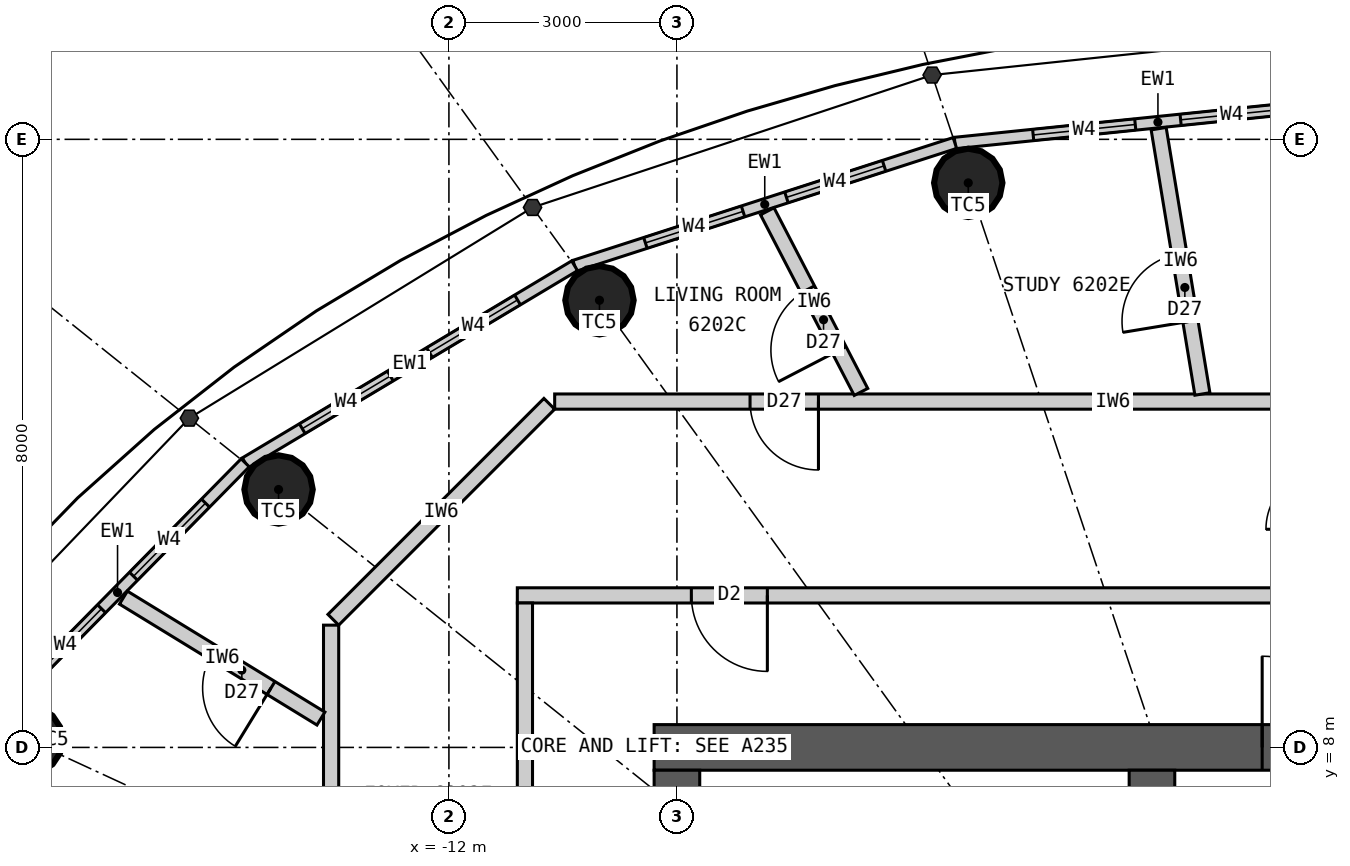
"""IFC4 building model, lengths in metres.
Left out: names, types, materials, properties, quantities, classifications, styles, units other than length and angle.
Written with IfcOpenShell. Run it as: python <this file> out.ifc"""

import sys

from ifc_helpers import new_model, si_unit, direction, frame, frame_2d, origin, origin_2d, place, context, subcontext, project, spatial, rectangle, circle, extrude, clip, halfspace, element, fill, save


model = new_model("IFC4")
c1 = context("Model", 3, precision=1e-05, world=origin(), true_north=direction((0.0, 1.0)))
c2 = subcontext(c1, "Body", "Model", "MODEL_VIEW")
j1 = project(units=[si_unit("LENGTHUNIT", "METRE"), si_unit("PLANEANGLEUNIT", "RADIAN")], contexts=[c1])
p1 = place(None, origin())
s1 = spatial("IfcSite", under=j1, at=p1, CompositionType="ELEMENT")
p2 = place(p1, origin())
s2 = spatial("IfcBuilding", under=s1, at=p2, CompositionType="ELEMENT")
p3 = place(p2, frame((0.0, 0.0, 229.2)))
s3 = spatial("IfcBuildingStorey", under=s2, at=p3, CompositionType="ELEMENT", Elevation=229.2)
for number, where, z_axis, x_axis in (
    (1, (-5.167, 15.427, 0.0), (0.0, 0.0, 1.0), (1.0, 0.0, 0.0)),
    (2, (-10.019, 13.883, 0.0), (0.0, 0.0, 1.0), (1.0, 0.0, 0.0)),
    (3, (-14.241, 11.393, 0.0), (0.0, 0.0, 1.0), (1.0, 0.0, 0.0)),
    (4, (-17.532, 8.098, 0.0), (0.0, 0.0, 1.0), (1.0, 0.0, 0.0)),
):
    element("IfcColumn", number, at=place(p3, frame(where, z_axis=z_axis, x_axis=x_axis)), inside=s3, PredefinedType="COLUMN", context=c2, shape_type="Clipping", body=[
        clip(extrude(circle(Radius=0.45, at=origin_2d()), origin(), (0.0, 0.0, 1.0), 3.3), halfspace(frame((0.0, 0.0, 2.25), z_axis=(0.0, 0.0, 1.0), x_axis=(1.0, 0.0, 0.0)), False)),
    ])
p4 = place(p3, frame((-9.3, 8.0, 0.0), z_axis=(0.0, 0.0, 1.0), x_axis=(1.0, 0.0, 0.0)))
e5 = element("IfcWall", 5, at=p4, inside=s3, PredefinedType="SHEAR", context=c2, shape_type="SweptSolid", body=[
    extrude(rectangle(XDim=18.6, YDim=0.6, at=frame_2d((9.3, 0.0))), origin(), (0.0, 0.0, 1.0), 3.3),
])
p5 = place(p4, frame((8.0, 0.0, 0.0)))
e6 = element("IfcOpeningElement", 6, at=p5, cuts=e5, PredefinedType="OPENING", context=c2, shape_type="SweptSolid", body=[
    extrude(rectangle(XDim=1.2, YDim=2.2, at=frame_2d((0.6, 1.1))), frame((0.0, 0.31, 0.0), z_axis=(0.0, -1.0, 0.0), x_axis=(1.0, 0.0, 0.0)), (0.0, 0.0, 1.0), 0.62),
])
p6 = place(p4, frame((15.6, 0.0, 0.0)))
e7 = element("IfcOpeningElement", 7, at=p6, cuts=e5, PredefinedType="OPENING", context=c2, shape_type="SweptSolid", body=[
    extrude(rectangle(XDim=0.9, YDim=2.2, at=frame_2d((0.45, 1.1))), frame((0.0, 0.31, 0.0), z_axis=(0.0, -1.0, 0.0), x_axis=(1.0, 0.0, 0.0)), (0.0, 0.0, 1.0), 0.62),
])
p7 = place(p3, frame((-9.0, 7.7, 0.0), z_axis=(0.0, 0.0, 1.0), x_axis=(0.0, -1.0, 0.0)))
e8 = element("IfcWall", 8, at=p7, inside=s3, PredefinedType="SHEAR", context=c2, shape_type="SweptSolid", body=[
    extrude(rectangle(XDim=15.4, YDim=0.6, at=frame_2d((7.7, 0.0))), origin(), (0.0, 0.0, 1.0), 3.3),
])
p8 = place(p7, frame((6.8, 0.0, 0.0)))
e9 = element("IfcOpeningElement", 9, at=p8, cuts=e8, PredefinedType="OPENING", context=c2, shape_type="SweptSolid", body=[
    extrude(rectangle(XDim=1.8, YDim=2.2, at=frame_2d((0.9, 1.1))), frame((0.0, 0.31, 0.0), z_axis=(0.0, -1.0, 0.0), x_axis=(1.0, 0.0, 0.0)), (0.0, 0.0, 1.0), 0.62),
])
p9 = place(p3, frame((-2.75, 4.5, 0.0), z_axis=(0.0, 0.0, 1.0), x_axis=(0.0, 1.0, 0.0)))
e10 = element("IfcWall", 10, at=p9, inside=s3, PredefinedType="SHEAR", context=c2, shape_type="SweptSolid", body=[
    extrude(rectangle(XDim=3.2, YDim=0.6, at=frame_2d((1.6, 0.0))), origin(), (0.0, 0.0, 1.0), 3.3),
])
p10 = place(p9, frame((0.925, 0.0, 0.0)))
e11 = element("IfcOpeningElement", 11, at=p10, cuts=e10, PredefinedType="OPENING", context=c2, shape_type="SweptSolid", body=[
    extrude(rectangle(XDim=1.1, YDim=2.2, at=frame_2d((0.55, 1.1))), frame((0.0, 0.31, 0.0), z_axis=(0.0, -1.0, 0.0), x_axis=(1.0, 0.0, 0.0)), (0.0, 0.0, 1.0), 0.62),
])
p11 = place(p3, frame((0.0, 16.5, 0.0), z_axis=(0.0, 0.0, 1.0), x_axis=(-0.994774574972, -0.102095763818, 0.0)))
e12 = element("IfcWall", 12, at=p11, inside=s3, PredefinedType="ELEMENTEDWALL", context=c2, shape_type="SweptSolid", body=[
    extrude(rectangle(XDim=5.371, YDim=0.15, at=frame_2d((2.686, 0.0))), origin(), (0.0, 0.0, 1.0), 3.05),
])
p12 = place(p11, frame((1.035, 0.0, 0.9)))
e13 = element("IfcOpeningElement", 13, at=p12, cuts=e12, PredefinedType="OPENING", context=c2, shape_type="SweptSolid", body=[
    extrude(rectangle(XDim=1.35, YDim=1.9, at=frame_2d((0.675, 0.95))), frame((0.0, 0.085, 0.0), z_axis=(0.0, -1.0, 0.0), x_axis=(1.0, 0.0, 0.0)), (0.0, 0.0, 1.0), 0.17),
])
p13 = place(p11, frame((2.985, 0.0, 0.9)))
e14 = element("IfcOpeningElement", 14, at=p13, cuts=e12, PredefinedType="OPENING", context=c2, shape_type="SweptSolid", body=[
    extrude(rectangle(XDim=1.35, YDim=1.9, at=frame_2d((0.675, 0.95))), frame((0.0, 0.085, 0.0), z_axis=(0.0, -1.0, 0.0), x_axis=(1.0, 0.0, 0.0)), (0.0, 0.0, 1.0), 0.17),
])
p14 = place(p3, frame((-5.343, 15.952, 0.0), z_axis=(0.0, 0.0, 1.0), x_axis=(-0.951644702515, -0.307200846638, 0.0)))
e15 = element("IfcWall", 15, at=p14, inside=s3, PredefinedType="ELEMENTEDWALL", context=c2, shape_type="SweptSolid", body=[
    extrude(rectangle(XDim=5.258, YDim=0.15, at=frame_2d((2.629, 0.0))), origin(), (0.0, 0.0, 1.0), 3.05),
])
p15 = place(p14, frame((0.979, 0.0, 0.9)))
e16 = element("IfcOpeningElement", 16, at=p15, cuts=e15, PredefinedType="OPENING", context=c2, shape_type="SweptSolid", body=[
    extrude(rectangle(XDim=1.35, YDim=1.9, at=frame_2d((0.675, 0.95))), frame((0.0, 0.085, 0.0), z_axis=(0.0, -1.0, 0.0), x_axis=(1.0, 0.0, 0.0)), (0.0, 0.0, 1.0), 0.17),
])
p16 = place(p14, frame((2.929, 0.0, 0.9)))
e17 = element("IfcOpeningElement", 17, at=p16, cuts=e15, PredefinedType="OPENING", context=c2, shape_type="SweptSolid", body=[
    extrude(rectangle(XDim=1.35, YDim=1.9, at=frame_2d((0.675, 0.95))), frame((0.0, 0.085, 0.0), z_axis=(0.0, -1.0, 0.0), x_axis=(1.0, 0.0, 0.0)), (0.0, 0.0, 1.0), 0.17),
])
p17 = place(p3, frame((-10.346, 14.336, 0.0), z_axis=(0.0, 0.0, 1.0), x_axis=(-0.85822150553, -0.513279502265, 0.0)))
e18 = element("IfcWall", 18, at=p17, inside=s3, PredefinedType="ELEMENTEDWALL", context=c2, shape_type="SweptSolid", body=[
    extrude(rectangle(XDim=5.05, YDim=0.15, at=frame_2d((2.525, 0.0))), origin(), (0.0, 0.0, 1.0), 3.05),
])
p18 = place(p17, frame((0.875, 0.0, 0.9)))
e19 = element("IfcOpeningElement", 19, at=p18, cuts=e18, PredefinedType="OPENING", context=c2, shape_type="SweptSolid", body=[
    extrude(rectangle(XDim=1.35, YDim=1.9, at=frame_2d((0.675, 0.95))), frame((0.0, 0.085, 0.0), z_axis=(0.0, -1.0, 0.0), x_axis=(1.0, 0.0, 0.0)), (0.0, 0.0, 1.0), 0.17),
])
p19 = place(p17, frame((2.825, 0.0, 0.9)))
e20 = element("IfcOpeningElement", 20, at=p19, cuts=e18, PredefinedType="OPENING", context=c2, shape_type="SweptSolid", body=[
    extrude(rectangle(XDim=1.35, YDim=1.9, at=frame_2d((0.675, 0.95))), frame((0.0, 0.085, 0.0), z_axis=(0.0, -1.0, 0.0), x_axis=(1.0, 0.0, 0.0)), (0.0, 0.0, 1.0), 0.17),
])
p20 = place(p3, frame((-14.68, 11.744, 0.0), z_axis=(0.0, 0.0, 1.0), x_axis=(-0.701527379618, -0.712642501993, 0.0)))
e21 = element("IfcWall", 21, at=p20, inside=s3, PredefinedType="ELEMENTEDWALL", context=c2, shape_type="SweptSolid", body=[
    extrude(rectangle(XDim=4.788, YDim=0.15, at=frame_2d((2.394, 0.0))), origin(), (0.0, 0.0, 1.0), 3.05),
])
p21 = place(p20, frame((0.744, 0.0, 0.9)))
e22 = element("IfcOpeningElement", 22, at=p21, cuts=e21, PredefinedType="OPENING", context=c2, shape_type="SweptSolid", body=[
    extrude(rectangle(XDim=1.35, YDim=1.9, at=frame_2d((0.675, 0.95))), frame((0.0, 0.085, 0.0), z_axis=(0.0, -1.0, 0.0), x_axis=(1.0, 0.0, 0.0)), (0.0, 0.0, 1.0), 0.17),
])
p22 = place(p20, frame((2.694, 0.0, 0.9)))
e23 = element("IfcOpeningElement", 23, at=p22, cuts=e21, PredefinedType="OPENING", context=c2, shape_type="SweptSolid", body=[
    extrude(rectangle(XDim=1.35, YDim=1.9, at=frame_2d((0.675, 0.95))), frame((0.0, 0.085, 0.0), z_axis=(0.0, -1.0, 0.0), x_axis=(1.0, 0.0, 0.0)), (0.0, 0.0, 1.0), 0.17),
])
p23 = place(p3, frame((-11.1, 10.0, 0.0), z_axis=(0.0, 0.0, 1.0), x_axis=(1.0, 0.0, 0.0)))
e24 = element("IfcWall", 24, at=p23, inside=s3, PredefinedType="PARTITIONING", context=c2, shape_type="SweptSolid", body=[
    extrude(rectangle(XDim=22.2, YDim=0.2, at=frame_2d((11.1, 0.0))), origin(), (0.0, 0.0, 1.0), 3.05),
])
p24 = place(p23, frame((2.29, 0.0, 0.0)))
e25 = element("IfcOpeningElement", 25, at=p24, cuts=e24, PredefinedType="OPENING", context=c2, shape_type="SweptSolid", body=[
    extrude(rectangle(XDim=1.0, YDim=2.2, at=frame_2d((0.5, 1.1))), frame((0.0, 0.11, 0.0), z_axis=(0.0, -1.0, 0.0), x_axis=(1.0, 0.0, 0.0)), (0.0, 0.0, 1.0), 0.22),
])
p25 = place(p3, frame((-11.0, 9.9, 0.0), z_axis=(0.0, 0.0, 1.0), x_axis=(0.0, -1.0, 0.0)))
e26 = element("IfcWall", 26, at=p25, inside=s3, PredefinedType="PARTITIONING", context=c2, shape_type="SweptSolid", body=[
    extrude(rectangle(XDim=19.8, YDim=0.2, at=frame_2d((9.9, 0.0))), origin(), (0.0, 0.0, 1.0), 3.05),
])
p26 = place(p25, frame((11.444, 0.0, 0.0)))
e27 = element("IfcOpeningElement", 27, at=p26, cuts=e26, PredefinedType="OPENING", context=c2, shape_type="SweptSolid", body=[
    extrude(rectangle(XDim=1.0, YDim=2.2, at=frame_2d((0.5, 1.1))), frame((0.0, 0.11, 0.0), z_axis=(0.0, -1.0, 0.0), x_axis=(1.0, 0.0, 0.0)), (0.0, 0.0, 1.0), 0.22),
])
p27 = place(p3, frame((4.082, 12.55, 0.0), z_axis=(0.0, 0.0, 1.0), x_axis=(-1.0, 0.0, 0.0)))
e28 = element("IfcWall", 28, at=p27, inside=s3, PredefinedType="PARTITIONING", context=c2, shape_type="SweptSolid", body=[
    extrude(rectangle(XDim=14.691, YDim=0.2, at=frame_2d((7.345, 0.0))), origin(), (0.0, 0.0, 1.0), 3.05),
])
p28 = place(p27, frame((2.102, 0.0, 0.0)))
e29 = element("IfcOpeningElement", 29, at=p28, cuts=e28, PredefinedType="OPENING", context=c2, shape_type="SweptSolid", body=[
    extrude(rectangle(XDim=0.8, YDim=2.1, at=frame_2d((0.4, 1.05))), frame((0.0, 0.11, 0.0), z_axis=(0.0, -1.0, 0.0), x_axis=(1.0, 0.0, 0.0)), (0.0, 0.0, 1.0), 0.22),
])
p29 = place(p27, frame((11.22, 0.0, 0.0)))
e30 = element("IfcOpeningElement", 30, at=p29, cuts=e28, PredefinedType="OPENING", context=c2, shape_type="SweptSolid", body=[
    extrude(rectangle(XDim=0.9, YDim=2.1, at=frame_2d((0.45, 1.05))), frame((0.0, 0.11, 0.0), z_axis=(0.0, -1.0, 0.0), x_axis=(1.0, 0.0, 0.0)), (0.0, 0.0, 1.0), 0.22),
])
p30 = place(p3, frame((-10.679, 12.521, 0.0), z_axis=(0.0, 0.0, 1.0), x_axis=(-0.707106781187, -0.707106781187, 0.0)))
e31 = element("IfcWall", 31, at=p30, inside=s3, PredefinedType="PARTITIONING", context=c2, shape_type="SweptSolid", body=[
    extrude(rectangle(XDim=4.019, YDim=0.2, at=frame_2d((2.009, 0.0))), origin(), (0.0, 0.0, 1.0), 3.05),
])
p31 = place(p3, frame((-13.55, 9.609, 0.0), z_axis=(0.0, 0.0, 1.0), x_axis=(0.0, -1.0, 0.0)))
e32 = element("IfcWall", 32, at=p31, inside=s3, PredefinedType="PARTITIONING", context=c2, shape_type="SweptSolid", body=[
    extrude(rectangle(XDim=10.93, YDim=0.2, at=frame_2d((5.465, 0.0))), origin(), (0.0, 0.0, 1.0), 3.05),
])
p32 = place(p31, frame((6.877, 0.0, 0.0)))
e33 = element("IfcOpeningElement", 33, at=p32, cuts=e32, PredefinedType="OPENING", context=c2, shape_type="SweptSolid", body=[
    extrude(rectangle(XDim=0.9, YDim=2.1, at=frame_2d((0.45, 1.05))), frame((0.0, 0.11, 0.0), z_axis=(0.0, -1.0, 0.0), x_axis=(1.0, 0.0, 0.0)), (0.0, 0.0, 1.0), 0.22),
])
p33 = place(p31, frame((8.565, 0.0, 0.0)))
e34 = element("IfcOpeningElement", 34, at=p33, cuts=e32, PredefinedType="OPENING", context=c2, shape_type="SweptSolid", body=[
    extrude(rectangle(XDim=0.8, YDim=2.1, at=frame_2d((0.4, 1.05))), frame((0.0, 0.11, 0.0), z_axis=(0.0, -1.0, 0.0), x_axis=(1.0, 0.0, 0.0)), (0.0, 0.0, 1.0), 0.22),
])
p34 = place(p3, frame((-2.086, 12.65, 0.0), z_axis=(0.0, 0.0, 1.0), x_axis=(-0.162664077359, 0.986681507852, 0.0)))
e35 = element("IfcWall", 35, at=p34, inside=s3, PredefinedType="PARTITIONING", context=c2, shape_type="SweptSolid", body=[
    extrude(rectangle(XDim=3.538, YDim=0.2, at=frame_2d((1.769, 0.0))), origin(), (0.0, 0.0, 1.0), 3.05),
])
p35 = place(p34, frame((0.97, 0.0, 0.0)))
e36 = element("IfcOpeningElement", 36, at=p35, cuts=e35, PredefinedType="OPENING", context=c2, shape_type="SweptSolid", body=[
    extrude(rectangle(XDim=0.9, YDim=2.1, at=frame_2d((0.45, 1.05))), frame((0.0, 0.11, 0.0), z_axis=(0.0, -1.0, 0.0), x_axis=(1.0, 0.0, 0.0)), (0.0, 0.0, 1.0), 0.22),
])
p36 = place(p3, frame((-6.578, 12.677, 0.0), z_axis=(0.0, 0.0, 1.0), x_axis=(-0.460620531465, 0.887597164255, 0.0)))
e37 = element("IfcWall", 37, at=p36, inside=s3, PredefinedType="PARTITIONING", context=c2, shape_type="SweptSolid", body=[
    extrude(rectangle(XDim=2.678, YDim=0.2, at=frame_2d((1.339, 0.0))), origin(), (0.0, 0.0, 1.0), 3.05),
])
p37 = place(p36, frame((0.62, 0.0, 0.0)))
e38 = element("IfcOpeningElement", 38, at=p37, cuts=e37, PredefinedType="OPENING", context=c2, shape_type="SweptSolid", body=[
    extrude(rectangle(XDim=0.9, YDim=2.1, at=frame_2d((0.45, 1.05))), frame((0.0, 0.11, 0.0), z_axis=(0.0, -1.0, 0.0), x_axis=(1.0, 0.0, 0.0)), (0.0, 0.0, 1.0), 0.22),
])
p38 = place(p3, frame((-13.684, 8.38, 0.0), z_axis=(0.0, 0.0, 1.0), x_axis=(-0.852784302627, 0.522263279576, 0.0)))
e39 = element("IfcWall", 39, at=p38, inside=s3, PredefinedType="PARTITIONING", context=c2, shape_type="SweptSolid", body=[
    extrude(rectangle(XDim=3.047, YDim=0.2, at=frame_2d((1.523, 0.0))), origin(), (0.0, 0.0, 1.0), 3.05),
])
p39 = place(p38, frame((0.77, 0.0, 0.0)))
e40 = element("IfcOpeningElement", 40, at=p39, cuts=e39, PredefinedType="OPENING", context=c2, shape_type="SweptSolid", body=[
    extrude(rectangle(XDim=0.9, YDim=2.1, at=frame_2d((0.45, 1.05))), frame((0.0, 0.11, 0.0), z_axis=(0.0, -1.0, 0.0), x_axis=(1.0, 0.0, 0.0)), (0.0, 0.0, 1.0), 0.22),
])
p40 = place(p12, origin())
e41 = element("IfcWindow", 41, at=p40, inside=s3, PartitioningType="SINGLE_PANEL", PredefinedType="WINDOW", context=c2, shape_type="SweptSolid", body=[
    extrude(rectangle(XDim=1.35, YDim=1.9, at=frame_2d((0.675, 0.95))), frame((0.0, 0.03, 0.0), z_axis=(0.0, -1.0, 0.0), x_axis=(1.0, 0.0, 0.0)), (0.0, 0.0, 1.0), 0.06),
])
fill(e13, e41)
p41 = place(p13, origin())
e42 = element("IfcWindow", 42, at=p41, inside=s3, PartitioningType="SINGLE_PANEL", PredefinedType="WINDOW", context=c2, shape_type="SweptSolid", body=[
    extrude(rectangle(XDim=1.35, YDim=1.9, at=frame_2d((0.675, 0.95))), frame((0.0, 0.03, 0.0), z_axis=(0.0, -1.0, 0.0), x_axis=(1.0, 0.0, 0.0)), (0.0, 0.0, 1.0), 0.06),
])
fill(e14, e42)
p42 = place(p15, origin())
e43 = element("IfcWindow", 43, at=p42, inside=s3, PartitioningType="SINGLE_PANEL", PredefinedType="WINDOW", context=c2, shape_type="SweptSolid", body=[
    extrude(rectangle(XDim=1.35, YDim=1.9, at=frame_2d((0.675, 0.95))), frame((0.0, 0.03, 0.0), z_axis=(0.0, -1.0, 0.0), x_axis=(1.0, 0.0, 0.0)), (0.0, 0.0, 1.0), 0.06),
])
fill(e16, e43)
p43 = place(p16, origin())
e44 = element("IfcWindow", 44, at=p43, inside=s3, PartitioningType="SINGLE_PANEL", PredefinedType="WINDOW", context=c2, shape_type="SweptSolid", body=[
    extrude(rectangle(XDim=1.35, YDim=1.9, at=frame_2d((0.675, 0.95))), frame((0.0, 0.03, 0.0), z_axis=(0.0, -1.0, 0.0), x_axis=(1.0, 0.0, 0.0)), (0.0, 0.0, 1.0), 0.06),
])
fill(e17, e44)
p44 = place(p18, origin())
e45 = element("IfcWindow", 45, at=p44, inside=s3, PartitioningType="SINGLE_PANEL", PredefinedType="WINDOW", context=c2, shape_type="SweptSolid", body=[
    extrude(rectangle(XDim=1.35, YDim=1.9, at=frame_2d((0.675, 0.95))), frame((0.0, 0.03, 0.0), z_axis=(0.0, -1.0, 0.0), x_axis=(1.0, 0.0, 0.0)), (0.0, 0.0, 1.0), 0.06),
])
fill(e19, e45)
p45 = place(p19, origin())
e46 = element("IfcWindow", 46, at=p45, inside=s3, PartitioningType="SINGLE_PANEL", PredefinedType="WINDOW", context=c2, shape_type="SweptSolid", body=[
    extrude(rectangle(XDim=1.35, YDim=1.9, at=frame_2d((0.675, 0.95))), frame((0.0, 0.03, 0.0), z_axis=(0.0, -1.0, 0.0), x_axis=(1.0, 0.0, 0.0)), (0.0, 0.0, 1.0), 0.06),
])
fill(e20, e46)
p46 = place(p21, origin())
e47 = element("IfcWindow", 47, at=p46, inside=s3, PartitioningType="SINGLE_PANEL", PredefinedType="WINDOW", context=c2, shape_type="SweptSolid", body=[
    extrude(rectangle(XDim=1.35, YDim=1.9, at=frame_2d((0.675, 0.95))), frame((0.0, 0.03, 0.0), z_axis=(0.0, -1.0, 0.0), x_axis=(1.0, 0.0, 0.0)), (0.0, 0.0, 1.0), 0.06),
])
fill(e22, e47)
p47 = place(p22, origin())
e48 = element("IfcWindow", 48, at=p47, inside=s3, PartitioningType="SINGLE_PANEL", PredefinedType="WINDOW", context=c2, shape_type="SweptSolid", body=[
    extrude(rectangle(XDim=1.35, YDim=1.9, at=frame_2d((0.675, 0.95))), frame((0.0, 0.03, 0.0), z_axis=(0.0, -1.0, 0.0), x_axis=(1.0, 0.0, 0.0)), (0.0, 0.0, 1.0), 0.06),
])
fill(e23, e48)
p48 = place(p24, origin())
e49 = element("IfcDoor", 49, at=p48, inside=s3, OperationType="SINGLE_SWING_RIGHT", PredefinedType="DOOR", context=c2, shape_type="SweptSolid", body=[
    extrude(rectangle(XDim=1.0, YDim=2.2, at=frame_2d((0.5, 1.1))), frame((0.0, 0.025, 0.0), z_axis=(0.0, -1.0, 0.0), x_axis=(1.0, 0.0, 0.0)), (0.0, 0.0, 1.0), 0.05),
])
fill(e25, e49)
p49 = place(p29, origin())
e50 = element("IfcDoor", 50, at=p49, inside=s3, OperationType="SINGLE_SWING_LEFT", PredefinedType="DOOR", context=c2, shape_type="SweptSolid", body=[
    extrude(rectangle(XDim=0.9, YDim=2.1, at=frame_2d((0.45, 1.05))), frame((0.0, 0.025, 0.0), z_axis=(0.0, -1.0, 0.0), x_axis=(1.0, 0.0, 0.0)), (0.0, 0.0, 1.0), 0.05),
])
fill(e30, e50)
p50 = place(p35, origin())
e51 = element("IfcDoor", 51, at=p50, inside=s3, OperationType="SINGLE_SWING_LEFT", PredefinedType="DOOR", context=c2, shape_type="SweptSolid", body=[
    extrude(rectangle(XDim=0.9, YDim=2.1, at=frame_2d((0.45, 1.05))), frame((0.0, 0.025, 0.0), z_axis=(0.0, -1.0, 0.0), x_axis=(1.0, 0.0, 0.0)), (0.0, 0.0, 1.0), 0.05),
])
fill(e36, e51)
p51 = place(p37, origin())
e52 = element("IfcDoor", 52, at=p51, inside=s3, OperationType="SINGLE_SWING_LEFT", PredefinedType="DOOR", context=c2, shape_type="SweptSolid", body=[
    extrude(rectangle(XDim=0.9, YDim=2.1, at=frame_2d((0.45, 1.05))), frame((0.0, 0.025, 0.0), z_axis=(0.0, -1.0, 0.0), x_axis=(1.0, 0.0, 0.0)), (0.0, 0.0, 1.0), 0.05),
])
fill(e38, e52)
p52 = place(p39, origin())
e53 = element("IfcDoor", 53, at=p52, inside=s3, OperationType="SINGLE_SWING_LEFT", PredefinedType="DOOR", context=c2, shape_type="SweptSolid", body=[
    extrude(rectangle(XDim=0.9, YDim=2.1, at=frame_2d((0.45, 1.05))), frame((0.0, 0.025, 0.0), z_axis=(0.0, -1.0, 0.0), x_axis=(1.0, 0.0, 0.0)), (0.0, 0.0, 1.0), 0.05),
])
fill(e40, e53)
p53 = place(p5, origin())
e54 = element("IfcDoor", 54, at=p53, inside=s3, OperationType="SINGLE_SWING_LEFT", PredefinedType="DOOR", context=c2, shape_type="SweptSolid", body=[
    extrude(rectangle(XDim=1.2, YDim=2.2, at=frame_2d((0.6, 1.1))), frame((0.0, 0.025, 0.0), z_axis=(0.0, -1.0, 0.0), x_axis=(1.0, 0.0, 0.0)), (0.0, 0.0, 1.0), 0.05),
])
fill(e6, e54)
save(model, sys.argv[1])
